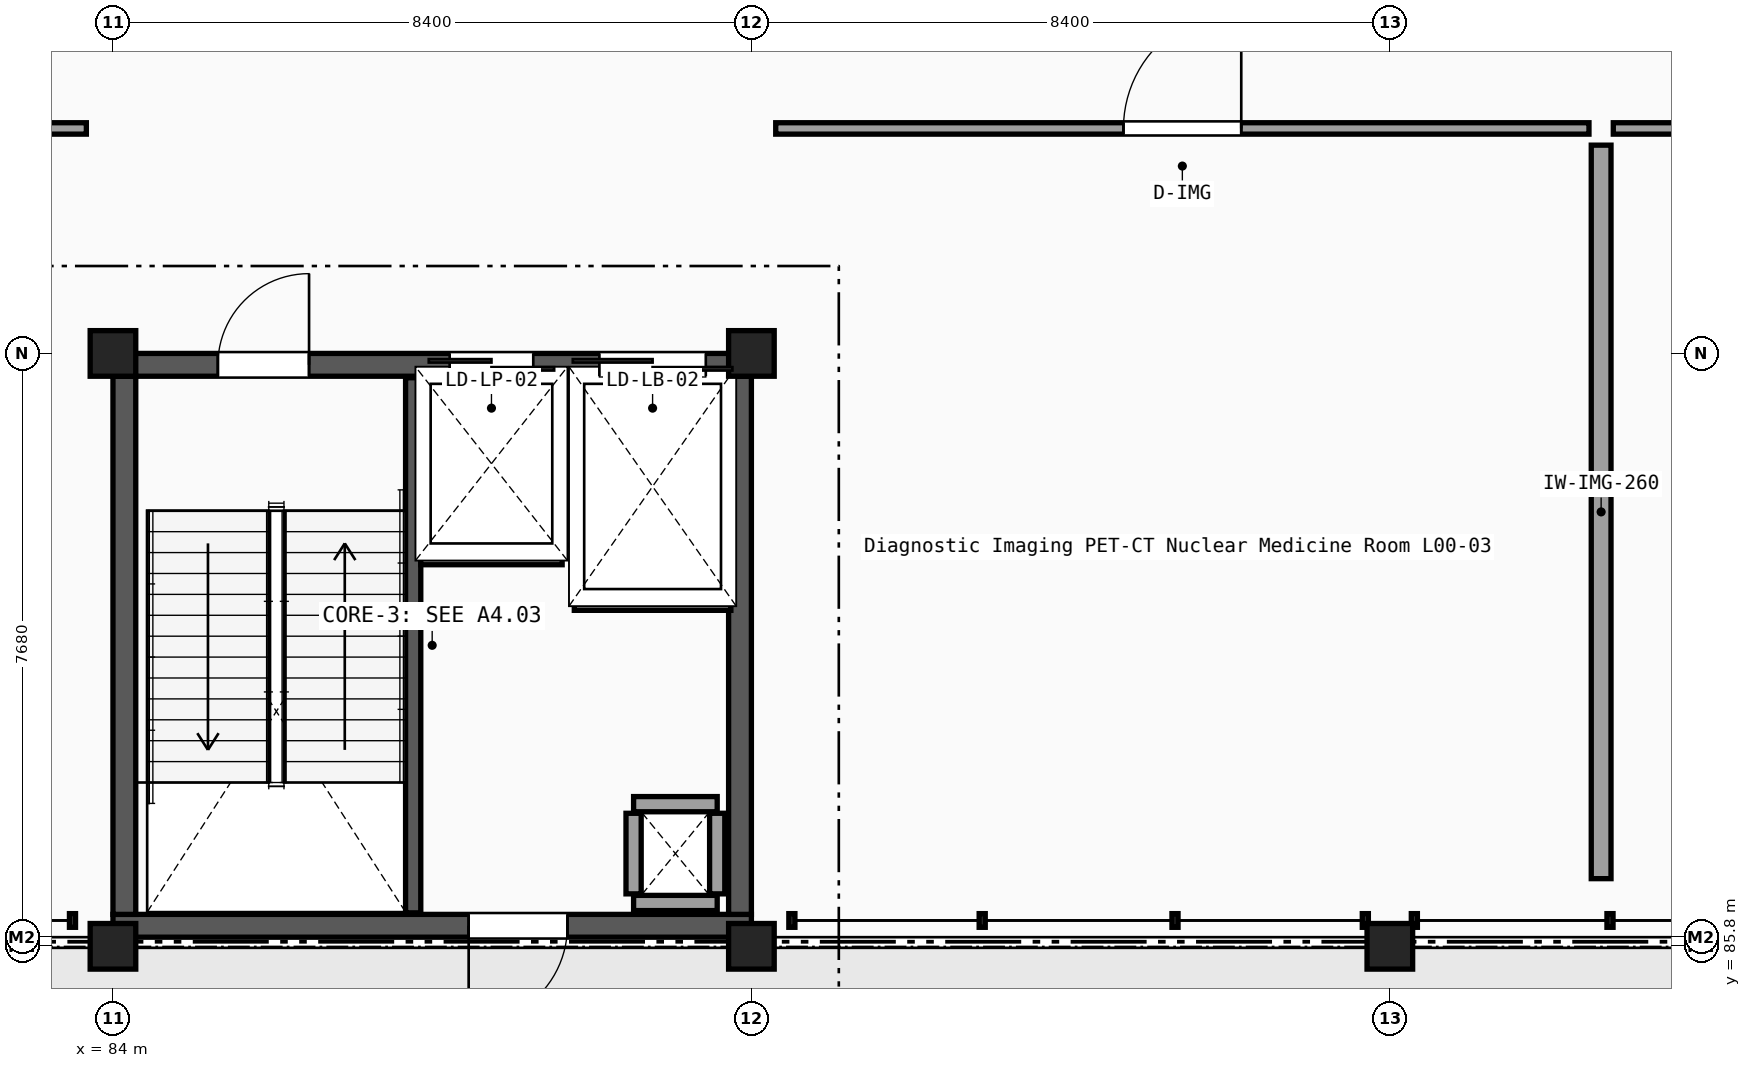
"""IFC4 building model, lengths in metres.
Left out: names, types, materials, properties, quantities, classifications, styles, units other than length and angle.
Written with IfcOpenShell. Run it as: python <this file> out.ifc"""

import sys

from ifc_helpers import new_model, si_unit, direction, frame, frame_2d, origin, origin_2d, place, context, subcontext, project, spatial, rectangle, i_section, extrude, element, fill, save


model = new_model("IFC4")
c1 = context("Model", 3, precision=1e-05, world=origin(), true_north=direction((0.0, 1.0)))
c2 = subcontext(c1, "Body", "Model", "MODEL_VIEW")
j1 = project(units=[si_unit("LENGTHUNIT", "METRE"), si_unit("PLANEANGLEUNIT", "RADIAN")], contexts=[c1])
p1 = place(None, origin())
s1 = spatial("IfcSite", under=j1, at=p1, CompositionType="ELEMENT")
p2 = place(p1, origin())
s2 = spatial("IfcBuilding", under=s1, at=p2, CompositionType="ELEMENT")
p3 = place(p2, origin())
s3 = spatial("IfcBuildingStorey", under=s2, at=p3, CompositionType="ELEMENT", Elevation=0.0)
for number, where, z_axis, x_axis in (
    (1, (84.0, 85.8, 0.0), (0.0, 0.0, 1.0), (1.0, 0.0, 0.0)),
    (2, (84.0, 93.6, 0.0), (0.0, 0.0, 1.0), (1.0, 0.0, 0.0)),
    (3, (92.4, 85.8, 0.0), (0.0, 0.0, 1.0), (1.0, 0.0, 0.0)),
    (4, (92.4, 93.6, 0.0), (0.0, 0.0, 1.0), (1.0, 0.0, 0.0)),
    (5, (100.8, 85.8, 0.0), (0.0, 0.0, 1.0), (1.0, 0.0, 0.0)),
):
    element("IfcColumn", number, at=place(p3, frame(where, z_axis=z_axis, x_axis=x_axis)), inside=s3, PredefinedType="COLUMN", context=c2, shape_type="SweptSolid", body=[
        extrude(i_section(OverallWidth=0.3, OverallDepth=0.6, WebThickness=0.015, FlangeThickness=0.03, FilletRadius=0.027, at=origin_2d()), origin(), (0.0, 0.0, 1.0), 5.1),
    ])
p4 = place(p3, frame((84.0, 86.07, 0.0), z_axis=(0.0, 0.0, 1.0), x_axis=(1.0, 0.0, 0.0)))
e6 = element("IfcWall", 6, at=p4, inside=s3, PredefinedType="SHEAR", context=c2, shape_type="SweptSolid", body=[
    extrude(rectangle(XDim=8.4, YDim=0.3, at=frame_2d((4.2, 0.0))), origin(), (0.0, 0.0, 1.0), 4.82),
])
p5 = place(p4, frame((4.68, 0.0, 0.0)))
e7 = element("IfcOpeningElement", 7, at=p5, cuts=e6, PredefinedType="OPENING", context=c2, shape_type="SweptSolid", body=[
    extrude(rectangle(XDim=1.3, YDim=2.2, at=frame_2d((0.65, 1.1))), frame((0.0, 0.16, 0.0), z_axis=(0.0, -1.0, 0.0), x_axis=(1.0, 0.0, 0.0)), (0.0, 0.0, 1.0), 0.32),
])
p6 = place(p3, frame((84.0, 93.45, 0.0), z_axis=(0.0, 0.0, 1.0), x_axis=(1.0, 0.0, 0.0)))
e8 = element("IfcWall", 8, at=p6, inside=s3, PredefinedType="SHEAR", context=c2, shape_type="SweptSolid", body=[
    extrude(rectangle(XDim=8.4, YDim=0.3, at=frame_2d((4.2, 0.0))), origin(), (0.0, 0.0, 1.0), 4.82),
])
p7 = place(p6, frame((1.38, 0.0, 0.0)))
e9 = element("IfcOpeningElement", 9, at=p7, cuts=e8, PredefinedType="OPENING", context=c2, shape_type="SweptSolid", body=[
    extrude(rectangle(XDim=1.2, YDim=2.15, at=frame_2d((0.6, 1.075))), frame((0.0, 0.16, 0.0), z_axis=(0.0, -1.0, 0.0), x_axis=(1.0, 0.0, 0.0)), (0.0, 0.0, 1.0), 0.32),
])
p8 = place(p6, frame((4.43, 0.0, 0.0)))
e10 = element("IfcOpeningElement", 10, at=p8, cuts=e8, PredefinedType="OPENING", context=c2, shape_type="SweptSolid", body=[
    extrude(rectangle(XDim=1.1, YDim=2.15, at=frame_2d((0.55, 1.075))), frame((0.0, 0.16, 0.0), z_axis=(0.0, -1.0, 0.0), x_axis=(1.0, 0.0, 0.0)), (0.0, 0.0, 1.0), 0.32),
])
p9 = place(p6, frame((6.4, 0.0, 0.0)))
e11 = element("IfcOpeningElement", 11, at=p9, cuts=e8, PredefinedType="OPENING", context=c2, shape_type="SweptSolid", body=[
    extrude(rectangle(XDim=1.4, YDim=2.2, at=frame_2d((0.7, 1.1))), frame((0.0, 0.16, 0.0), z_axis=(0.0, -1.0, 0.0), x_axis=(1.0, 0.0, 0.0)), (0.0, 0.0, 1.0), 0.32),
])
for number, where, z_axis, x_axis in (
    (12, (84.15, 86.22, 0.0), (0.0, 0.0, 1.0), (0.0, 1.0, 0.0)),
    (13, (92.25, 86.22, 0.0), (0.0, 0.0, 1.0), (0.0, 1.0, 0.0)),
):
    element("IfcWall", number, at=place(p3, frame(where, z_axis=z_axis, x_axis=x_axis)), inside=s3, PredefinedType="SHEAR", context=c2, shape_type="SweptSolid", body=[
        extrude(rectangle(XDim=7.08, YDim=0.3, at=frame_2d((3.54, 0.0))), origin(), (0.0, 0.0, 1.0), 4.82),
    ])
p10 = place(p3, frame((87.95, 86.24, 0.0), z_axis=(0.0, 0.0, 1.0), x_axis=(0.0, 1.0, 0.0)))
e14 = element("IfcWall", 14, at=p10, inside=s3, PredefinedType="SHEAR", context=c2, shape_type="SweptSolid", body=[
    extrude(rectangle(XDim=7.04, YDim=0.2, at=frame_2d((3.52, 0.0))), origin(), (0.0, 0.0, 1.0), 4.82),
])
for number, where, z_axis, x_axis in (
    (15, (90.85, 86.37, 0.0), (0.0, 0.0, 1.0), (1.0, 0.0, 0.0)),
    (16, (90.85, 87.67, 0.0), (0.0, 0.0, 1.0), (1.0, 0.0, 0.0)),
):
    element("IfcWall", number, at=place(p3, frame(where, z_axis=z_axis, x_axis=x_axis)), inside=s3, PredefinedType="PARTITIONING", context=c2, shape_type="SweptSolid", body=[
        extrude(rectangle(XDim=1.1, YDim=0.2, at=frame_2d((0.55, 0.0))), origin(), (0.0, 0.0, 1.0), 4.21),
    ])
for number, where, z_axis, x_axis in (
    (17, (90.85, 86.49, 0.0), (0.0, 0.0, 1.0), (0.0, 1.0, 0.0)),
    (18, (91.95, 86.49, 0.0), (0.0, 0.0, 1.0), (0.0, 1.0, 0.0)),
):
    element("IfcWall", number, at=place(p3, frame(where, z_axis=z_axis, x_axis=x_axis)), inside=s3, PredefinedType="PARTITIONING", context=c2, shape_type="SweptSolid", body=[
        extrude(rectangle(XDim=1.06, YDim=0.2, at=frame_2d((0.53, 0.0))), origin(), (0.0, 0.0, 1.0), 4.21),
    ])
p11 = place(p3, frame((89.94, 91.08, 0.0), z_axis=(0.0, 0.0, 1.0), x_axis=(0.0, 1.0, 0.0)))
e19 = element("IfcWall", 19, at=p11, inside=s3, PredefinedType="PARTITIONING", context=c2, shape_type="SweptSolid", body=[
    extrude(rectangle(XDim=2.14, YDim=0.2, at=frame_2d((1.07, 0.0))), origin(), (0.0, 0.0, 1.0), 4.21),
])
p12 = place(p3, frame((88.05, 90.92, 0.0), z_axis=(0.0, 0.0, 1.0), x_axis=(1.0, 0.0, 0.0)))
e20 = element("IfcWall", 20, at=p12, inside=s3, PredefinedType="PARTITIONING", context=c2, shape_type="SweptSolid", body=[
    extrude(rectangle(XDim=1.86, YDim=0.2, at=frame_2d((0.93, 0.0))), origin(), (0.0, 0.0, 1.0), 4.21),
])
p13 = place(p3, frame((90.07, 90.32, 0.0), z_axis=(0.0, 0.0, 1.0), x_axis=(1.0, 0.0, 0.0)))
e21 = element("IfcWall", 21, at=p13, inside=s3, PredefinedType="PARTITIONING", context=c2, shape_type="SweptSolid", body=[
    extrude(rectangle(XDim=2.06, YDim=0.2, at=frame_2d((1.03, 0.0))), origin(), (0.0, 0.0, 1.0), 4.21),
])
p14 = place(p3, frame((71.695, 96.56, 0.0), z_axis=(0.0, 0.0, 1.0), x_axis=(1.0, 0.0, 0.0)))
e22 = element("IfcWall", 22, at=p14, inside=s3, PredefinedType="PARTITIONING", context=c2, shape_type="SweptSolid", body=[
    extrude(rectangle(XDim=11.955, YDim=0.15, at=frame_2d((5.978, 0.0))), origin(), (0.0, 0.0, 1.0), 4.4),
])
p15 = place(p14, frame((5.202, 0.0, 0.0)))
e23 = element("IfcOpeningElement", 23, at=p15, cuts=e22, PredefinedType="OPENING", context=c2, shape_type="SweptSolid", body=[
    extrude(rectangle(XDim=1.55, YDim=2.25, at=frame_2d((0.775, 1.125))), frame((0.0, 0.085, 0.0), z_axis=(0.0, -1.0, 0.0), x_axis=(1.0, 0.0, 0.0)), (0.0, 0.0, 1.0), 0.17),
])
p16 = place(p3, frame((92.72, 96.56, 0.0), z_axis=(0.0, 0.0, 1.0), x_axis=(1.0, 0.0, 0.0)))
e24 = element("IfcWall", 24, at=p16, inside=s3, PredefinedType="PARTITIONING", context=c2, shape_type="SweptSolid", body=[
    extrude(rectangle(XDim=10.7, YDim=0.15, at=frame_2d((5.35, 0.0))), origin(), (0.0, 0.0, 1.0), 4.8),
])
p17 = place(p16, frame((4.575, 0.0, 0.0)))
e25 = element("IfcOpeningElement", 25, at=p17, cuts=e24, PredefinedType="OPENING", context=c2, shape_type="SweptSolid", body=[
    extrude(rectangle(XDim=1.55, YDim=2.25, at=frame_2d((0.775, 1.125))), frame((0.0, 0.085, 0.0), z_axis=(0.0, -1.0, 0.0), x_axis=(1.0, 0.0, 0.0)), (0.0, 0.0, 1.0), 0.17),
])
p18 = place(p3, frame((103.58, 86.69, 0.0), z_axis=(0.0, 0.0, 1.0), x_axis=(0.0, 1.0, 0.0)))
e26 = element("IfcWall", 26, at=p18, inside=s3, PredefinedType="PARTITIONING", context=c2, shape_type="SweptSolid", body=[
    extrude(rectangle(XDim=9.65, YDim=0.26, at=frame_2d((4.825, 0.0))), origin(), (0.0, 0.0, 1.0), 4.31),
])
p19 = place(p3, frame((103.74, 96.56, 0.0), z_axis=(0.0, 0.0, 1.0), x_axis=(1.0, 0.0, 0.0)))
e27 = element("IfcWall", 27, at=p19, inside=s3, PredefinedType="PARTITIONING", context=c2, shape_type="SweptSolid", body=[
    extrude(rectangle(XDim=10.62, YDim=0.15, at=frame_2d((5.31, 0.0))), origin(), (0.0, 0.0, 1.0), 4.4),
])
p20 = place(p19, frame((4.835, 0.0, 0.0)))
e28 = element("IfcOpeningElement", 28, at=p20, cuts=e27, PredefinedType="OPENING", context=c2, shape_type="SweptSolid", body=[
    extrude(rectangle(XDim=0.95, YDim=2.1, at=frame_2d((0.475, 1.05))), frame((0.0, 0.085, 0.0), z_axis=(0.0, -1.0, 0.0), x_axis=(1.0, 0.0, 0.0)), (0.0, 0.0, 1.0), 0.17),
])
p21 = place(p7, origin())
e29 = element("IfcDoor", 29, at=p21, inside=s3, OperationType="SINGLE_SWING_RIGHT", PredefinedType="DOOR", context=c2, shape_type="SweptSolid", body=[
    extrude(rectangle(XDim=1.2, YDim=2.15, at=frame_2d((0.6, 1.075))), frame((0.0, 0.025, 0.0), z_axis=(0.0, -1.0, 0.0), x_axis=(1.0, 0.0, 0.0)), (0.0, 0.0, 1.0), 0.05),
])
fill(e9, e29)
p22 = place(p5, frame((1.3, 0.0, 0.0), z_axis=(0.0, 0.0, 1.0), x_axis=(-1.0, 0.0, 0.0)))
e30 = element("IfcDoor", 30, at=p22, inside=s3, OperationType="SINGLE_SWING_LEFT", PredefinedType="DOOR", context=c2, shape_type="SweptSolid", body=[
    extrude(rectangle(XDim=1.3, YDim=2.2, at=frame_2d((0.65, 1.1))), frame((0.0, 0.025, 0.0), z_axis=(0.0, -1.0, 0.0), x_axis=(1.0, 0.0, 0.0)), (0.0, 0.0, 1.0), 0.05),
])
fill(e7, e30)
p23 = place(p8, origin())
e31 = element("IfcDoor", 31, at=p23, inside=s3, OperationType="DOUBLE_DOOR_SLIDING", PredefinedType="DOOR", context=c2, shape_type="SweptSolid", body=[
    extrude(rectangle(XDim=1.1, YDim=2.15, at=frame_2d((0.55, 1.075))), frame((0.0, 0.025, 0.0), z_axis=(0.0, -1.0, 0.0), x_axis=(1.0, 0.0, 0.0)), (0.0, 0.0, 1.0), 0.05),
])
fill(e10, e31)
p24 = place(p9, origin())
e32 = element("IfcDoor", 32, at=p24, inside=s3, OperationType="DOUBLE_DOOR_SLIDING", PredefinedType="DOOR", context=c2, shape_type="SweptSolid", body=[
    extrude(rectangle(XDim=1.4, YDim=2.2, at=frame_2d((0.7, 1.1))), frame((0.0, 0.025, 0.0), z_axis=(0.0, -1.0, 0.0), x_axis=(1.0, 0.0, 0.0)), (0.0, 0.0, 1.0), 0.05),
])
fill(e11, e32)
p25 = place(p17, origin())
e33 = element("IfcDoor", 33, at=p25, inside=s3, OperationType="SINGLE_SWING_RIGHT", PredefinedType="DOOR", context=c2, shape_type="SweptSolid", body=[
    extrude(rectangle(XDim=1.55, YDim=2.25, at=frame_2d((0.775, 1.125))), frame((0.0, 0.025, 0.0), z_axis=(0.0, -1.0, 0.0), x_axis=(1.0, 0.0, 0.0)), (0.0, 0.0, 1.0), 0.05),
])
fill(e25, e33)
save(model, sys.argv[1])
